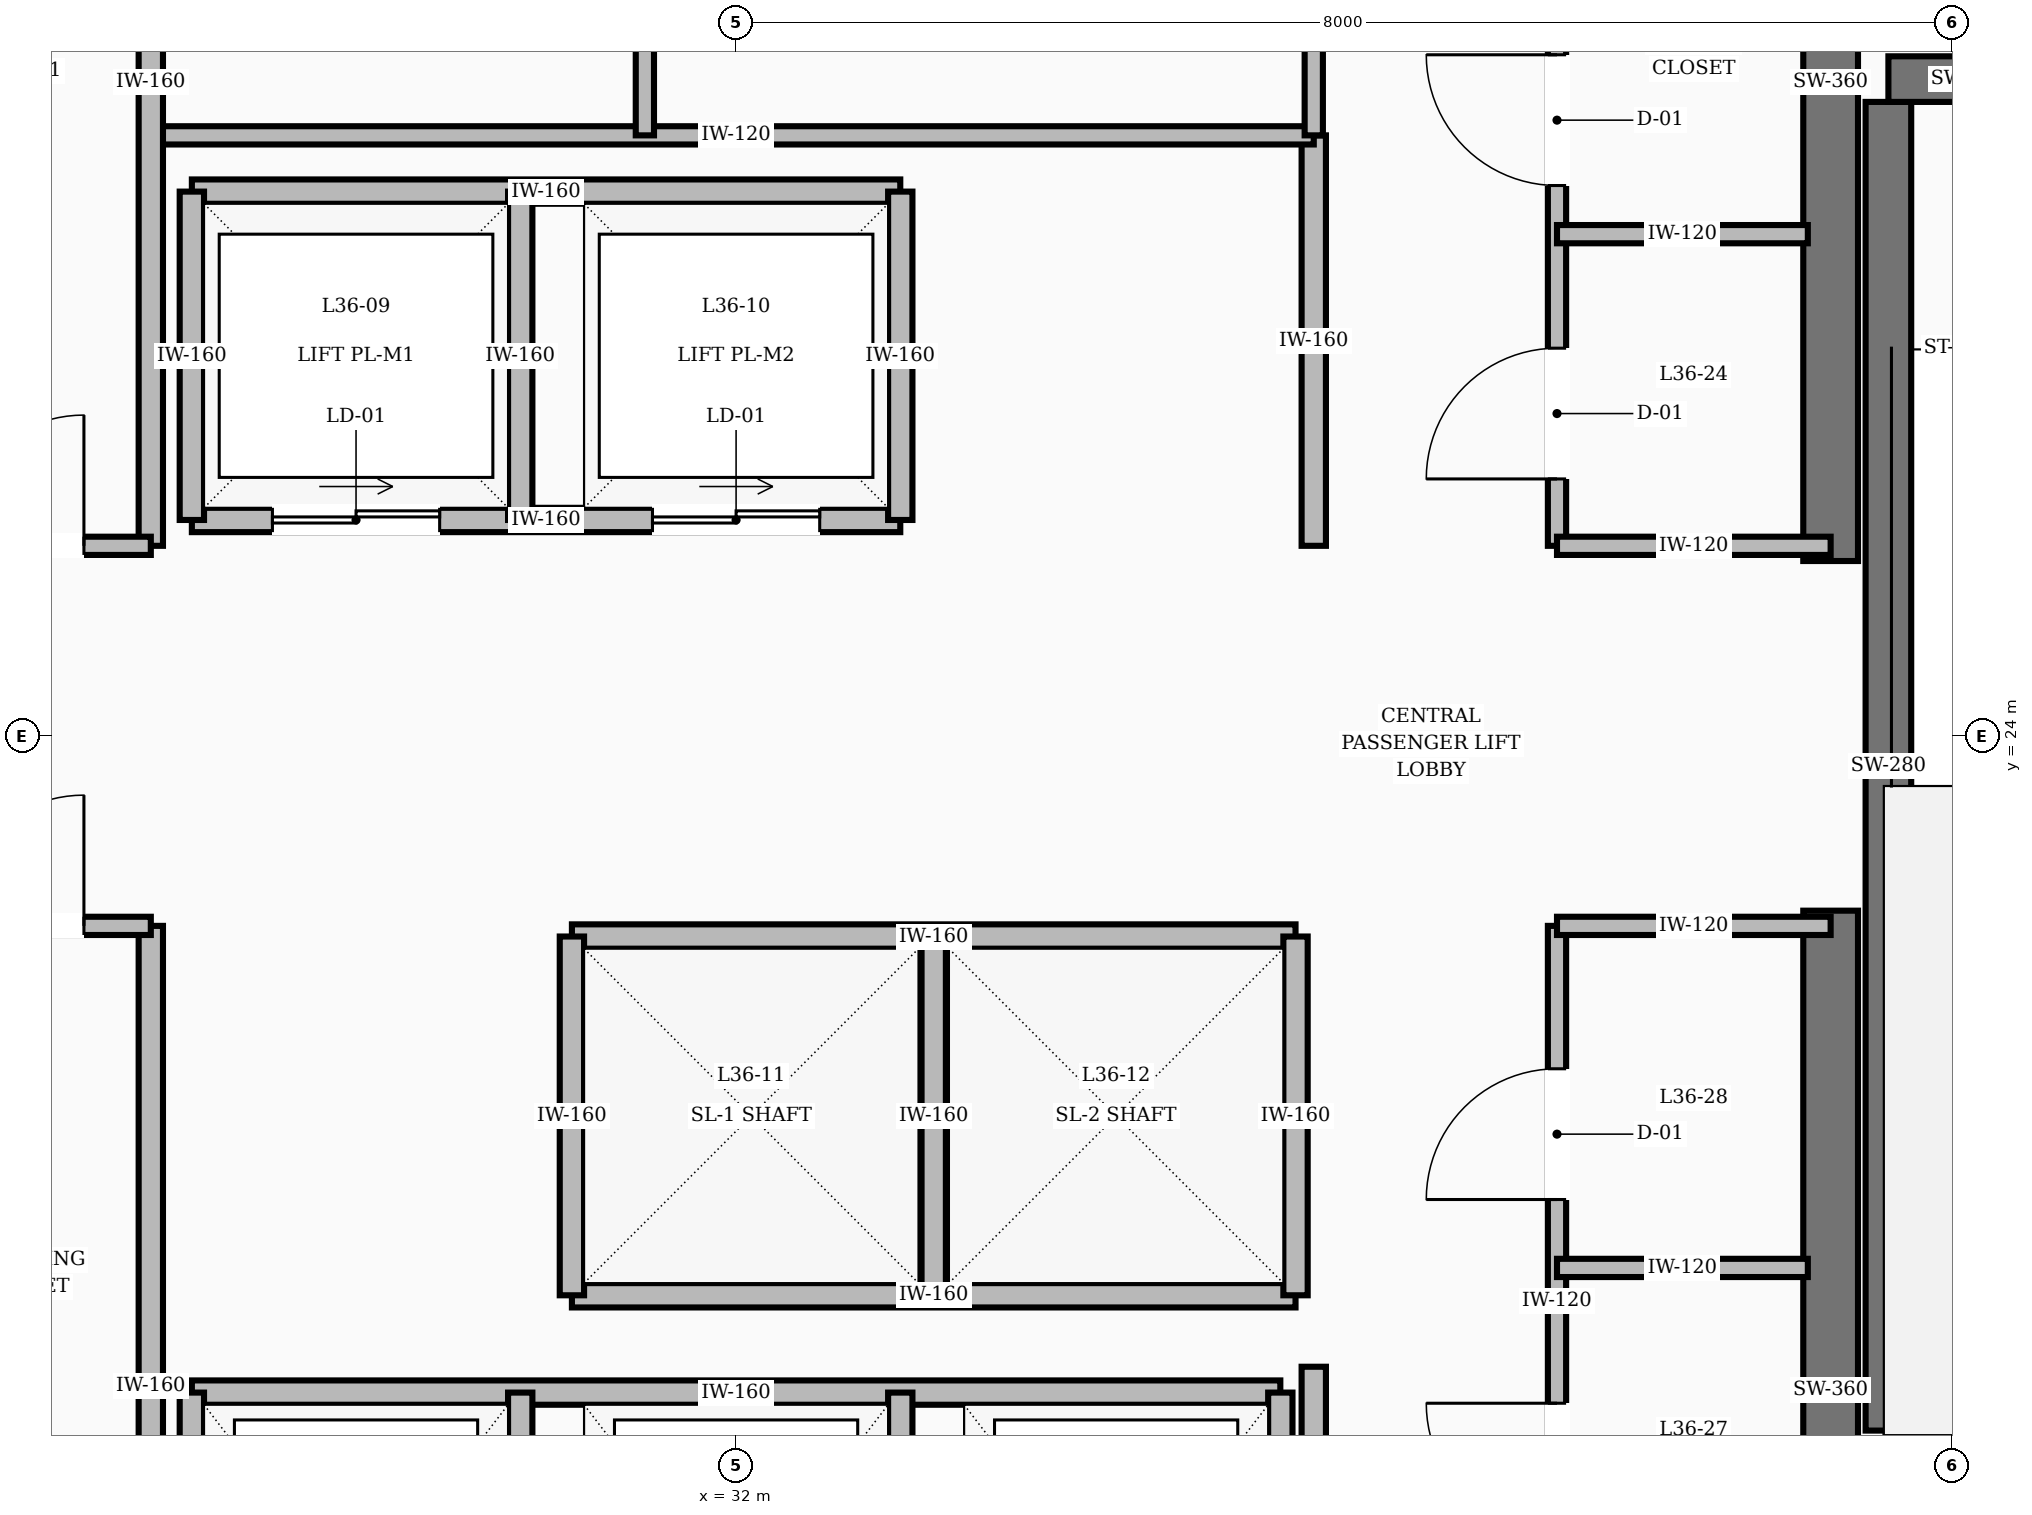
"""IFC4 building model, lengths in metres.
Left out: names, types, materials, properties, quantities, classifications, styles, units other than length and angle.
Written with IfcOpenShell. Run it as: python <this file> out.ifc"""

import sys

from ifc_helpers import new_model, si_unit, direction, frame, frame_2d, origin, place, context, subcontext, project, spatial, rectangle, extrude, element, fill, save


model = new_model("IFC4")
c1 = context("Model", 3, precision=1e-05, world=origin(), true_north=direction((0.0, 1.0)))
c2 = subcontext(c1, "Body", "Model", "MODEL_VIEW")
j1 = project(units=[si_unit("LENGTHUNIT", "METRE"), si_unit("PLANEANGLEUNIT", "RADIAN")], contexts=[c1])
p1 = place(None, origin())
s1 = spatial("IfcSite", under=j1, at=p1, CompositionType="ELEMENT")
p2 = place(p1, origin())
s2 = spatial("IfcBuilding", under=s1, at=p2, CompositionType="ELEMENT")
p3 = place(p2, frame((0.0, 0.0, 117.2)))
s3 = spatial("IfcBuildingStorey", under=s2, at=p3, CompositionType="ELEMENT", Elevation=117.2)
for number, where, z_axis, x_axis in (
    (1, (39.2, 16.55, 0.0), (0.0, 0.0, 1.0), (0.0, 1.0, 0.0)),
    (2, (39.2, 25.15, 0.0), (0.0, 0.0, 1.0), (0.0, 1.0, 0.0)),
):
    element("IfcWall", number, at=place(p3, frame(where, z_axis=z_axis, x_axis=x_axis)), inside=s3, PredefinedType="SHEAR", context=c2, shape_type="SweptSolid", body=[
        extrude(rectangle(XDim=6.3, YDim=0.36, at=frame_2d((3.15, 0.0))), origin(), (0.0, 0.0, 1.0), 3.6),
    ])
p4 = place(p3, frame((39.58, 19.43, 0.0), z_axis=(0.0, 0.0, 1.0), x_axis=(0.0, 1.0, 0.0)))
e3 = element("IfcWall", 3, at=p4, inside=s3, PredefinedType="SHEAR", context=c2, shape_type="SweptSolid", body=[
    extrude(rectangle(XDim=8.74, YDim=0.3, at=frame_2d((4.37, 0.0))), origin(), (0.0, 0.0, 1.0), 3.6),
])
p5 = place(p3, frame((39.58, 19.28, 0.0), z_axis=(0.0, 0.0, 1.0), x_axis=(1.0, 0.0, 0.0)))
e4 = element("IfcWall", 4, at=p5, inside=s3, PredefinedType="SHEAR", context=c2, shape_type="SweptSolid", body=[
    extrude(rectangle(XDim=3.6, YDim=0.3, at=frame_2d((1.8, 0.0))), origin(), (0.0, 0.0, 1.0), 3.6),
])
p6 = place(p3, frame((39.58, 28.32, 0.0), z_axis=(0.0, 0.0, 1.0), x_axis=(1.0, 0.0, 0.0)))
e5 = element("IfcWall", 5, at=p6, inside=s3, PredefinedType="SHEAR", context=c2, shape_type="SweptSolid", body=[
    extrude(rectangle(XDim=3.6, YDim=0.3, at=frame_2d((1.8, 0.0))), origin(), (0.0, 0.0, 1.0), 3.6),
])
p7 = place(p6, frame((1.3, 0.0, 0.0)))
e6 = element("IfcOpeningElement", 6, at=p7, cuts=e5, PredefinedType="OPENING", context=c2, shape_type="SweptSolid", body=[
    extrude(rectangle(XDim=1.1, YDim=2.1, at=frame_2d((0.55, 1.05))), frame((0.0, 0.16, 0.0), z_axis=(0.0, -1.0, 0.0), x_axis=(1.0, 0.0, 0.0)), (0.0, 0.0, 1.0), 0.32),
])
p8 = place(p3, frame((35.8, 16.55, 0.0), z_axis=(0.0, 0.0, 1.0), x_axis=(0.0, 1.0, 0.0)))
e7 = element("IfcWall", 7, at=p8, inside=s3, PredefinedType="SOLIDWALL", context=c2, shape_type="SweptSolid", body=[
    extrude(rectangle(XDim=3.3, YDim=0.16, at=frame_2d((1.65, 0.0))), origin(), (0.0, 0.0, 1.0), 2.8),
])
p9 = place(p3, frame((35.8, 25.25, 0.0), z_axis=(0.0, 0.0, 1.0), x_axis=(0.0, 1.0, 0.0)))
e8 = element("IfcWall", 8, at=p9, inside=s3, PredefinedType="SOLIDWALL", context=c2, shape_type="SweptSolid", body=[
    extrude(rectangle(XDim=2.7, YDim=0.16, at=frame_2d((1.35, 0.0))), origin(), (0.0, 0.0, 1.0), 2.8),
])
p10 = place(p3, frame((28.42, 25.42, 0.0), z_axis=(0.0, 0.0, 1.0), x_axis=(1.0, 0.0, 0.0)))
e9 = element("IfcWall", 9, at=p10, inside=s3, PredefinedType="SOLIDWALL", context=c2, shape_type="SweptSolid", body=[
    extrude(rectangle(XDim=4.66, YDim=0.16, at=frame_2d((2.33, 0.0))), origin(), (0.0, 0.0, 1.0), 2.8),
])
p11 = place(p10, frame((0.53, 0.0, 0.0)))
e10 = element("IfcOpeningElement", 10, at=p11, cuts=e9, PredefinedType="OPENING", context=c2, shape_type="SweptSolid", body=[
    extrude(rectangle(XDim=1.1, YDim=2.15, at=frame_2d((0.55, 1.075))), frame((0.0, 0.09, 0.0), z_axis=(0.0, -1.0, 0.0), x_axis=(1.0, 0.0, 0.0)), (0.0, 0.0, 1.0), 0.18),
])
p12 = place(p10, frame((3.03, 0.0, 0.0)))
e11 = element("IfcOpeningElement", 11, at=p12, cuts=e9, PredefinedType="OPENING", context=c2, shape_type="SweptSolid", body=[
    extrude(rectangle(XDim=1.1, YDim=2.15, at=frame_2d((0.55, 1.075))), frame((0.0, 0.09, 0.0), z_axis=(0.0, -1.0, 0.0), x_axis=(1.0, 0.0, 0.0)), (0.0, 0.0, 1.0), 0.18),
])
p13 = place(p3, frame((28.42, 27.58, 0.0), z_axis=(0.0, 0.0, 1.0), x_axis=(1.0, 0.0, 0.0)))
e12 = element("IfcWall", 12, at=p13, inside=s3, PredefinedType="SOLIDWALL", context=c2, shape_type="SweptSolid", body=[
    extrude(rectangle(XDim=4.66, YDim=0.16, at=frame_2d((2.33, 0.0))), origin(), (0.0, 0.0, 1.0), 2.8),
])
for number, where, z_axis, x_axis in (
    (13, (28.42, 25.42, 0.0), (0.0, 0.0, 1.0), (0.0, 1.0, 0.0)),
    (14, (30.58, 25.42, 0.0), (0.0, 0.0, 1.0), (0.0, 1.0, 0.0)),
    (15, (33.08, 25.42, 0.0), (0.0, 0.0, 1.0), (0.0, 1.0, 0.0)),
):
    element("IfcWall", number, at=place(p3, frame(where, z_axis=z_axis, x_axis=x_axis)), inside=s3, PredefinedType="SOLIDWALL", context=c2, shape_type="SweptSolid", body=[
        extrude(rectangle(XDim=2.16, YDim=0.16, at=frame_2d((1.08, 0.0))), origin(), (0.0, 0.0, 1.0), 2.8),
    ])
for number, where, z_axis, x_axis in (
    (16, (30.92, 22.68, 0.0), (0.0, 0.0, 1.0), (1.0, 0.0, 0.0)),
    (17, (30.92, 20.32, 0.0), (0.0, 0.0, 1.0), (1.0, 0.0, 0.0)),
):
    element("IfcWall", number, at=place(p3, frame(where, z_axis=z_axis, x_axis=x_axis)), inside=s3, PredefinedType="SOLIDWALL", context=c2, shape_type="SweptSolid", body=[
        extrude(rectangle(XDim=4.76, YDim=0.16, at=frame_2d((2.38, 0.0))), origin(), (0.0, 0.0, 1.0), 2.8),
    ])
for number, where, z_axis, x_axis in (
    (18, (30.92, 20.32, 0.0), (0.0, 0.0, 1.0), (0.0, 1.0, 0.0)),
    (19, (33.3, 20.32, 0.0), (0.0, 0.0, 1.0), (0.0, 1.0, 0.0)),
    (20, (35.68, 20.32, 0.0), (0.0, 0.0, 1.0), (0.0, 1.0, 0.0)),
):
    element("IfcWall", number, at=place(p3, frame(where, z_axis=z_axis, x_axis=x_axis)), inside=s3, PredefinedType="SOLIDWALL", context=c2, shape_type="SweptSolid", body=[
        extrude(rectangle(XDim=2.36, YDim=0.16, at=frame_2d((1.18, 0.0))), origin(), (0.0, 0.0, 1.0), 2.8),
    ])
p14 = place(p3, frame((28.42, 19.68, 0.0), z_axis=(0.0, 0.0, 1.0), x_axis=(1.0, 0.0, 0.0)))
e21 = element("IfcWall", 21, at=p14, inside=s3, PredefinedType="SOLIDWALL", context=c2, shape_type="SweptSolid", body=[
    extrude(rectangle(XDim=7.16, YDim=0.16, at=frame_2d((3.58, 0.0))), origin(), (0.0, 0.0, 1.0), 2.8),
])
for number, where, z_axis, x_axis in (
    (22, (28.42, 16.92, 0.0), (0.0, 0.0, 1.0), (0.0, 1.0, 0.0)),
    (23, (30.58, 16.92, 0.0), (0.0, 0.0, 1.0), (0.0, 1.0, 0.0)),
    (24, (33.08, 16.92, 0.0), (0.0, 0.0, 1.0), (0.0, 1.0, 0.0)),
    (25, (35.58, 16.92, 0.0), (0.0, 0.0, 1.0), (0.0, 1.0, 0.0)),
):
    element("IfcWall", number, at=place(p3, frame(where, z_axis=z_axis, x_axis=x_axis)), inside=s3, PredefinedType="SOLIDWALL", context=c2, shape_type="SweptSolid", body=[
        extrude(rectangle(XDim=2.76, YDim=0.16, at=frame_2d((1.38, 0.0))), origin(), (0.0, 0.0, 1.0), 2.8),
    ])
p15 = place(p3, frame((28.2, 27.95, 0.0), z_axis=(0.0, 0.0, 1.0), x_axis=(1.0, 0.0, 0.0)))
e26 = element("IfcWall", 26, at=p15, inside=s3, PredefinedType="PARTITIONING", context=c2, shape_type="SweptSolid", body=[
    extrude(rectangle(XDim=7.6, YDim=0.12, at=frame_2d((3.8, 0.0))), origin(), (0.0, 0.0, 1.0), 2.8),
])
p16 = place(p3, frame((35.8, 27.95, 0.0), z_axis=(0.0, 0.0, 1.0), x_axis=(0.0, 1.0, 0.0)))
e27 = element("IfcWall", 27, at=p16, inside=s3, PredefinedType="PARTITIONING", context=c2, shape_type="SweptSolid", body=[
    extrude(rectangle(XDim=3.5, YDim=0.12, at=frame_2d((1.75, 0.0))), origin(), (0.0, 0.0, 1.0), 2.8),
])
p17 = place(p16, frame((1.275, 0.0, 0.0)))
e28 = element("IfcOpeningElement", 28, at=p17, cuts=e27, PredefinedType="OPENING", context=c2, shape_type="SweptSolid", body=[
    extrude(rectangle(XDim=0.95, YDim=2.1, at=frame_2d((0.475, 1.05))), frame((0.0, 0.07, 0.0), z_axis=(0.0, -1.0, 0.0), x_axis=(1.0, 0.0, 0.0)), (0.0, 0.0, 1.0), 0.14),
])
p18 = place(p3, frame((31.4, 27.95, 0.0), z_axis=(0.0, 0.0, 1.0), x_axis=(0.0, 1.0, 0.0)))
e29 = element("IfcWall", 29, at=p18, inside=s3, PredefinedType="PARTITIONING", context=c2, shape_type="SweptSolid", body=[
    extrude(rectangle(XDim=3.5, YDim=0.12, at=frame_2d((1.75, 0.0))), origin(), (0.0, 0.0, 1.0), 2.8),
])
p19 = place(p3, frame((28.15, 16.7, 0.0), z_axis=(0.0, 0.0, 1.0), x_axis=(0.0, 1.0, 0.0)))
e30 = element("IfcWall", 30, at=p19, inside=s3, PredefinedType="SOLIDWALL", context=c2, shape_type="SweptSolid", body=[
    extrude(rectangle(XDim=6.05, YDim=0.16, at=frame_2d((3.025, 0.0))), origin(), (0.0, 0.0, 1.0), 2.8),
])
p20 = place(p3, frame((28.15, 25.25, 0.0), z_axis=(0.0, 0.0, 1.0), x_axis=(0.0, 1.0, 0.0)))
e31 = element("IfcWall", 31, at=p20, inside=s3, PredefinedType="SOLIDWALL", context=c2, shape_type="SweptSolid", body=[
    extrude(rectangle(XDim=6.1, YDim=0.16, at=frame_2d((3.05, 0.0))), origin(), (0.0, 0.0, 1.0), 2.8),
])
p21 = place(p3, frame((24.95, 25.25, 0.0), z_axis=(0.0, 0.0, 1.0), x_axis=(1.0, 0.0, 0.0)))
e32 = element("IfcWall", 32, at=p21, inside=s3, PredefinedType="PARTITIONING", context=c2, shape_type="SweptSolid", body=[
    extrude(rectangle(XDim=3.2, YDim=0.12, at=frame_2d((1.6, 0.0))), origin(), (0.0, 0.0, 1.0), 2.8),
])
p22 = place(p21, frame((0.44, 0.0, 0.0)))
e33 = element("IfcOpeningElement", 33, at=p22, cuts=e32, PredefinedType="OPENING", context=c2, shape_type="SweptSolid", body=[
    extrude(rectangle(XDim=0.86, YDim=2.1, at=frame_2d((0.43, 1.05))), frame((0.0, 0.07, 0.0), z_axis=(0.0, -1.0, 0.0), x_axis=(1.0, 0.0, 0.0)), (0.0, 0.0, 1.0), 0.14),
])
p23 = place(p21, frame((1.9, 0.0, 0.0)))
e34 = element("IfcOpeningElement", 34, at=p23, cuts=e32, PredefinedType="OPENING", context=c2, shape_type="SweptSolid", body=[
    extrude(rectangle(XDim=0.86, YDim=2.1, at=frame_2d((0.43, 1.05))), frame((0.0, 0.07, 0.0), z_axis=(0.0, -1.0, 0.0), x_axis=(1.0, 0.0, 0.0)), (0.0, 0.0, 1.0), 0.14),
])
p24 = place(p3, frame((24.95, 22.75, 0.0), z_axis=(0.0, 0.0, 1.0), x_axis=(1.0, 0.0, 0.0)))
e35 = element("IfcWall", 35, at=p24, inside=s3, PredefinedType="PARTITIONING", context=c2, shape_type="SweptSolid", body=[
    extrude(rectangle(XDim=3.2, YDim=0.12, at=frame_2d((1.6, 0.0))), origin(), (0.0, 0.0, 1.0), 2.8),
])
p25 = place(p24, frame((0.44, 0.0, 0.0)))
e36 = element("IfcOpeningElement", 36, at=p25, cuts=e35, PredefinedType="OPENING", context=c2, shape_type="SweptSolid", body=[
    extrude(rectangle(XDim=0.86, YDim=2.1, at=frame_2d((0.43, 1.05))), frame((0.0, 0.07, 0.0), z_axis=(0.0, -1.0, 0.0), x_axis=(1.0, 0.0, 0.0)), (0.0, 0.0, 1.0), 0.14),
])
p26 = place(p24, frame((1.9, 0.0, 0.0)))
e37 = element("IfcOpeningElement", 37, at=p26, cuts=e35, PredefinedType="OPENING", context=c2, shape_type="SweptSolid", body=[
    extrude(rectangle(XDim=0.86, YDim=2.1, at=frame_2d((0.43, 1.05))), frame((0.0, 0.07, 0.0), z_axis=(0.0, -1.0, 0.0), x_axis=(1.0, 0.0, 0.0)), (0.0, 0.0, 1.0), 0.14),
])
p27 = place(p3, frame((37.4, 25.25, 0.0), z_axis=(0.0, 0.0, 1.0), x_axis=(0.0, 1.0, 0.0)))
e38 = element("IfcWall", 38, at=p27, inside=s3, PredefinedType="PARTITIONING", context=c2, shape_type="SweptSolid", body=[
    extrude(rectangle(XDim=6.2, YDim=0.12, at=frame_2d((3.1, 0.0))), origin(), (0.0, 0.0, 1.0), 2.8),
])
p28 = place(p27, frame((0.44, 0.0, 0.0)))
e39 = element("IfcOpeningElement", 39, at=p28, cuts=e38, PredefinedType="OPENING", context=c2, shape_type="SweptSolid", body=[
    extrude(rectangle(XDim=0.86, YDim=2.1, at=frame_2d((0.43, 1.05))), frame((0.0, 0.07, 0.0), z_axis=(0.0, -1.0, 0.0), x_axis=(1.0, 0.0, 0.0)), (0.0, 0.0, 1.0), 0.14),
])
p29 = place(p27, frame((2.37, 0.0, 0.0)))
e40 = element("IfcOpeningElement", 40, at=p29, cuts=e38, PredefinedType="OPENING", context=c2, shape_type="SweptSolid", body=[
    extrude(rectangle(XDim=0.86, YDim=2.1, at=frame_2d((0.43, 1.05))), frame((0.0, 0.07, 0.0), z_axis=(0.0, -1.0, 0.0), x_axis=(1.0, 0.0, 0.0)), (0.0, 0.0, 1.0), 0.14),
])
p30 = place(p27, frame((4.39, 0.0, 0.0)))
e41 = element("IfcOpeningElement", 41, at=p30, cuts=e38, PredefinedType="OPENING", context=c2, shape_type="SweptSolid", body=[
    extrude(rectangle(XDim=0.86, YDim=2.1, at=frame_2d((0.43, 1.05))), frame((0.0, 0.07, 0.0), z_axis=(0.0, -1.0, 0.0), x_axis=(1.0, 0.0, 0.0)), (0.0, 0.0, 1.0), 0.14),
])
p31 = place(p3, frame((37.4, 25.25, 0.0), z_axis=(0.0, 0.0, 1.0), x_axis=(1.0, 0.0, 0.0)))
e42 = element("IfcWall", 42, at=p31, inside=s3, PredefinedType="PARTITIONING", context=c2, shape_type="SweptSolid", body=[
    extrude(rectangle(XDim=1.8, YDim=0.12, at=frame_2d((0.9, 0.0))), origin(), (0.0, 0.0, 1.0), 2.8),
])
p32 = place(p3, frame((37.4, 18.3, 0.0), z_axis=(0.0, 0.0, 1.0), x_axis=(0.0, 1.0, 0.0)))
e43 = element("IfcWall", 43, at=p32, inside=s3, PredefinedType="PARTITIONING", context=c2, shape_type="SweptSolid", body=[
    extrude(rectangle(XDim=4.45, YDim=0.12, at=frame_2d((2.225, 0.0))), origin(), (0.0, 0.0, 1.0), 2.8),
])
p33 = place(p32, frame((0.45, 0.0, 0.0)))
e44 = element("IfcOpeningElement", 44, at=p33, cuts=e43, PredefinedType="OPENING", context=c2, shape_type="SweptSolid", body=[
    extrude(rectangle(XDim=0.86, YDim=2.1, at=frame_2d((0.43, 1.05))), frame((0.0, 0.07, 0.0), z_axis=(0.0, -1.0, 0.0), x_axis=(1.0, 0.0, 0.0)), (0.0, 0.0, 1.0), 0.14),
])
p34 = place(p32, frame((2.65, 0.0, 0.0)))
e45 = element("IfcOpeningElement", 45, at=p34, cuts=e43, PredefinedType="OPENING", context=c2, shape_type="SweptSolid", body=[
    extrude(rectangle(XDim=0.86, YDim=2.1, at=frame_2d((0.43, 1.05))), frame((0.0, 0.07, 0.0), z_axis=(0.0, -1.0, 0.0), x_axis=(1.0, 0.0, 0.0)), (0.0, 0.0, 1.0), 0.14),
])
p35 = place(p3, frame((37.4, 22.75, 0.0), z_axis=(0.0, 0.0, 1.0), x_axis=(1.0, 0.0, 0.0)))
e46 = element("IfcWall", 46, at=p35, inside=s3, PredefinedType="PARTITIONING", context=c2, shape_type="SweptSolid", body=[
    extrude(rectangle(XDim=1.8, YDim=0.12, at=frame_2d((0.9, 0.0))), origin(), (0.0, 0.0, 1.0), 2.8),
])
for number, where, z_axis, x_axis in (
    (47, (37.4, 27.3, 0.0), (0.0, 0.0, 1.0), (1.0, 0.0, 0.0)),
    (48, (37.4, 20.5, 0.0), (0.0, 0.0, 1.0), (1.0, 0.0, 0.0)),
):
    element("IfcWall", number, at=place(p3, frame(where, z_axis=z_axis, x_axis=x_axis)), inside=s3, PredefinedType="PARTITIONING", context=c2, shape_type="SweptSolid", body=[
        extrude(rectangle(XDim=1.65, YDim=0.12, at=frame_2d((0.825, 0.0))), origin(), (0.0, 0.0, 1.0), 2.8),
    ])
p36 = place(p11, origin())
e49 = element("IfcDoor", 49, at=p36, inside=s3, OperationType="SLIDING_TO_RIGHT", PredefinedType="DOOR", context=c2, shape_type="SweptSolid", body=[
    extrude(rectangle(XDim=1.1, YDim=2.15, at=frame_2d((0.55, 1.075))), frame((0.0, 0.025, 0.0), z_axis=(0.0, -1.0, 0.0), x_axis=(1.0, 0.0, 0.0)), (0.0, 0.0, 1.0), 0.05),
])
fill(e10, e49)
p37 = place(p12, origin())
e50 = element("IfcDoor", 50, at=p37, inside=s3, OperationType="SLIDING_TO_RIGHT", PredefinedType="DOOR", context=c2, shape_type="SweptSolid", body=[
    extrude(rectangle(XDim=1.1, YDim=2.15, at=frame_2d((0.55, 1.075))), frame((0.0, 0.025, 0.0), z_axis=(0.0, -1.0, 0.0), x_axis=(1.0, 0.0, 0.0)), (0.0, 0.0, 1.0), 0.05),
])
fill(e11, e50)
p38 = place(p23, origin())
e51 = element("IfcDoor", 51, at=p38, inside=s3, OperationType="SINGLE_SWING_RIGHT", PredefinedType="DOOR", context=c2, shape_type="SweptSolid", body=[
    extrude(rectangle(XDim=0.86, YDim=2.1, at=frame_2d((0.43, 1.05))), frame((0.0, 0.025, 0.0), z_axis=(0.0, -1.0, 0.0), x_axis=(1.0, 0.0, 0.0)), (0.0, 0.0, 1.0), 0.05),
])
fill(e34, e51)
p39 = place(p26, origin())
e52 = element("IfcDoor", 52, at=p39, inside=s3, OperationType="SINGLE_SWING_RIGHT", PredefinedType="DOOR", context=c2, shape_type="SweptSolid", body=[
    extrude(rectangle(XDim=0.86, YDim=2.1, at=frame_2d((0.43, 1.05))), frame((0.0, 0.025, 0.0), z_axis=(0.0, -1.0, 0.0), x_axis=(1.0, 0.0, 0.0)), (0.0, 0.0, 1.0), 0.05),
])
fill(e37, e52)
p40 = place(p28, origin())
e53 = element("IfcDoor", 53, at=p40, inside=s3, OperationType="SINGLE_SWING_LEFT", PredefinedType="DOOR", context=c2, shape_type="SweptSolid", body=[
    extrude(rectangle(XDim=0.86, YDim=2.1, at=frame_2d((0.43, 1.05))), frame((0.0, 0.025, 0.0), z_axis=(0.0, -1.0, 0.0), x_axis=(1.0, 0.0, 0.0)), (0.0, 0.0, 1.0), 0.05),
])
fill(e39, e53)
p41 = place(p29, origin())
e54 = element("IfcDoor", 54, at=p41, inside=s3, OperationType="SINGLE_SWING_RIGHT", PredefinedType="DOOR", context=c2, shape_type="SweptSolid", body=[
    extrude(rectangle(XDim=0.86, YDim=2.1, at=frame_2d((0.43, 1.05))), frame((0.0, 0.025, 0.0), z_axis=(0.0, -1.0, 0.0), x_axis=(1.0, 0.0, 0.0)), (0.0, 0.0, 1.0), 0.05),
])
fill(e40, e54)
p42 = place(p33, origin())
e55 = element("IfcDoor", 55, at=p42, inside=s3, OperationType="SINGLE_SWING_RIGHT", PredefinedType="DOOR", context=c2, shape_type="SweptSolid", body=[
    extrude(rectangle(XDim=0.86, YDim=2.1, at=frame_2d((0.43, 1.05))), frame((0.0, 0.025, 0.0), z_axis=(0.0, -1.0, 0.0), x_axis=(1.0, 0.0, 0.0)), (0.0, 0.0, 1.0), 0.05),
])
fill(e44, e55)
p43 = place(p34, origin())
e56 = element("IfcDoor", 56, at=p43, inside=s3, OperationType="SINGLE_SWING_LEFT", PredefinedType="DOOR", context=c2, shape_type="SweptSolid", body=[
    extrude(rectangle(XDim=0.86, YDim=2.1, at=frame_2d((0.43, 1.05))), frame((0.0, 0.025, 0.0), z_axis=(0.0, -1.0, 0.0), x_axis=(1.0, 0.0, 0.0)), (0.0, 0.0, 1.0), 0.05),
])
fill(e45, e56)
save(model, sys.argv[1])
